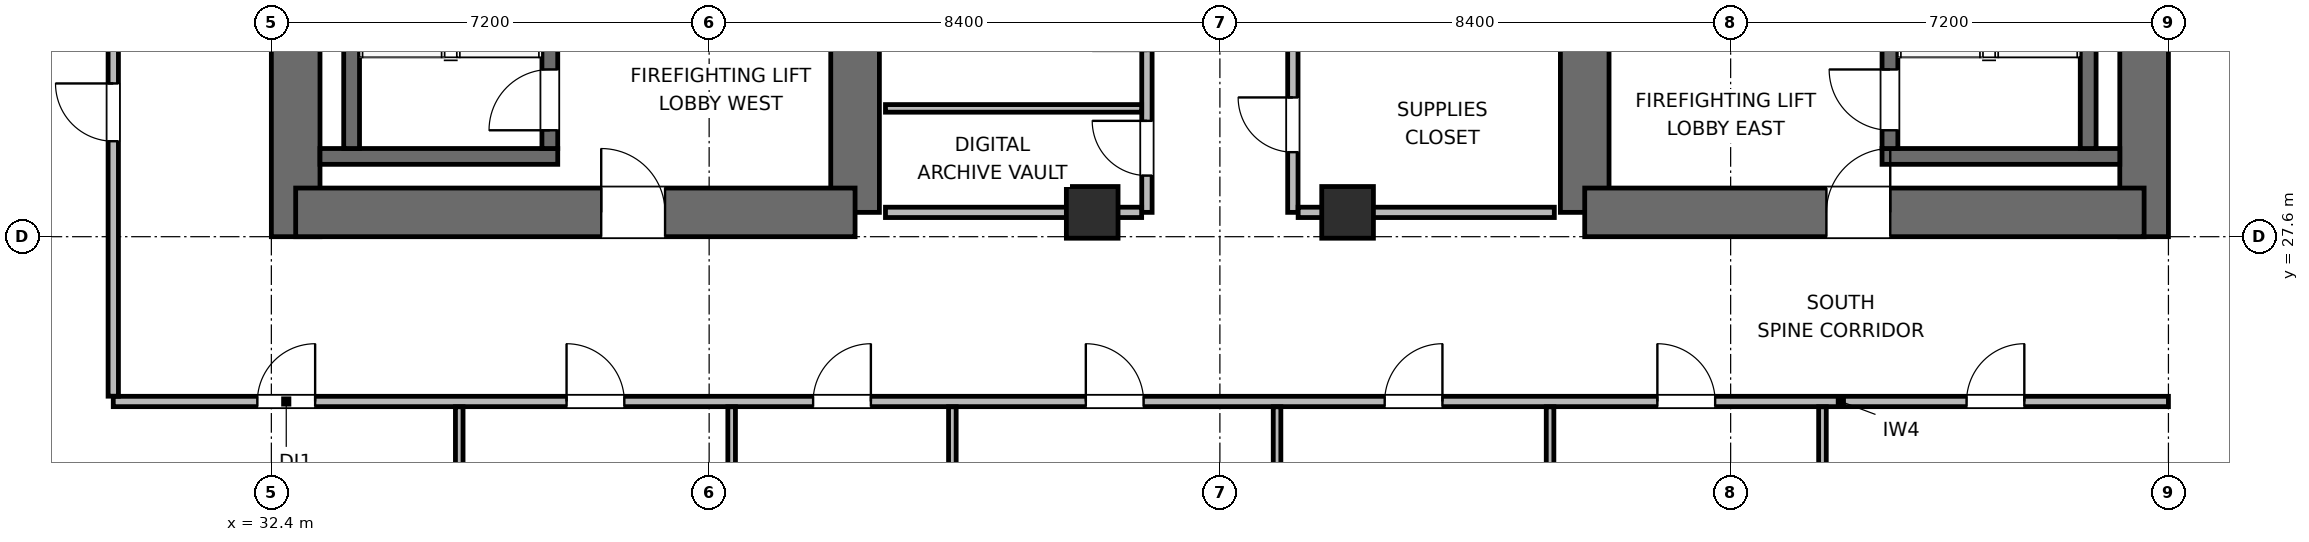
"""IFC4 building model, lengths in metres.
Left out: names, types, materials, properties, quantities, classifications, styles, units other than length and angle.
Written with IfcOpenShell. Run it as: python <this file> out.ifc"""

import sys

from ifc_helpers import new_model, si_unit, direction, frame, frame_2d, origin, origin_2d, place, context, subcontext, project, spatial, rectangle, extrude, element, fill, save


model = new_model("IFC4")
c1 = context("Model", 3, precision=1e-05, world=origin(), true_north=direction((0.0, 1.0)))
c2 = subcontext(c1, "Body", "Model", "MODEL_VIEW")
j1 = project(units=[si_unit("LENGTHUNIT", "METRE"), si_unit("PLANEANGLEUNIT", "RADIAN")], contexts=[c1])
p1 = place(None, origin())
s1 = spatial("IfcSite", under=j1, at=p1, CompositionType="ELEMENT")
p2 = place(p1, origin())
s2 = spatial("IfcBuilding", under=s1, at=p2, CompositionType="ELEMENT")
p3 = place(p2, frame((0.0, 0.0, 170.1)))
s3 = spatial("IfcBuildingStorey", under=s2, at=p3, CompositionType="ELEMENT", Elevation=170.1)
p4 = place(p3, frame((32.8, 27.6, 0.0), z_axis=(0.0, 0.0, 1.0), x_axis=(0.0, 1.0, 0.0)))
e1 = element("IfcWall", 1, at=p4, inside=s3, PredefinedType="SHEAR", context=c2, shape_type="SweptSolid", body=[
    extrude(rectangle(XDim=16.8, YDim=0.8, at=frame_2d((8.4, 0.0))), origin(), (0.0, 0.0, 1.0), 3.9),
])
p5 = place(p3, frame((42.0, 28.0, 0.0), z_axis=(0.0, 0.0, 1.0), x_axis=(0.0, 1.0, 0.0)))
e2 = element("IfcWall", 2, at=p5, inside=s3, PredefinedType="SHEAR", context=c2, shape_type="SweptSolid", body=[
    extrude(rectangle(XDim=6.4, YDim=0.8, at=frame_2d((3.2, 0.0))), origin(), (0.0, 0.0, 1.0), 3.9),
])
p6 = place(p3, frame((32.8, 28.0, 0.0), z_axis=(0.0, 0.0, 1.0), x_axis=(1.0, 0.0, 0.0)))
e3 = element("IfcWall", 3, at=p6, inside=s3, PredefinedType="SHEAR", context=c2, shape_type="SweptSolid", body=[
    extrude(rectangle(XDim=9.2, YDim=0.8, at=frame_2d((4.6, 0.0))), origin(), (0.0, 0.0, 1.0), 3.9),
])
p7 = place(p6, frame((5.025, 0.0, 0.0)))
e4 = element("IfcOpeningElement", 4, at=p7, cuts=e3, PredefinedType="OPENING", context=c2, shape_type="SweptSolid", body=[
    extrude(rectangle(XDim=1.05, YDim=2.04, at=frame_2d((0.525, 1.02))), frame((0.0, 0.41, 0.0), z_axis=(0.0, -1.0, 0.0), x_axis=(1.0, 0.0, 0.0)), (0.0, 0.0, 1.0), 0.82),
])
p8 = place(p3, frame((54.0, 28.0, 0.0), z_axis=(0.0, 0.0, 1.0), x_axis=(0.0, 1.0, 0.0)))
e5 = element("IfcWall", 5, at=p8, inside=s3, PredefinedType="SHEAR", context=c2, shape_type="SweptSolid", body=[
    extrude(rectangle(XDim=7.8, YDim=0.8, at=frame_2d((3.9, 0.0))), origin(), (0.0, 0.0, 1.0), 3.9),
])
p9 = place(p3, frame((63.2, 27.6, 0.0), z_axis=(0.0, 0.0, 1.0), x_axis=(0.0, 1.0, 0.0)))
e6 = element("IfcWall", 6, at=p9, inside=s3, PredefinedType="SHEAR", context=c2, shape_type="SweptSolid", body=[
    extrude(rectangle(XDim=16.8, YDim=0.8, at=frame_2d((8.4, 0.0))), origin(), (0.0, 0.0, 1.0), 3.9),
])
p10 = place(p3, frame((54.0, 28.0, 0.0), z_axis=(0.0, 0.0, 1.0), x_axis=(1.0, 0.0, 0.0)))
e7 = element("IfcWall", 7, at=p10, inside=s3, PredefinedType="SHEAR", context=c2, shape_type="SweptSolid", body=[
    extrude(rectangle(XDim=9.2, YDim=0.8, at=frame_2d((4.6, 0.0))), origin(), (0.0, 0.0, 1.0), 3.9),
])
p11 = place(p10, frame((3.975, 0.0, 0.0)))
e8 = element("IfcOpeningElement", 8, at=p11, cuts=e7, PredefinedType="OPENING", context=c2, shape_type="SweptSolid", body=[
    extrude(rectangle(XDim=1.05, YDim=2.04, at=frame_2d((0.525, 1.02))), frame((0.0, 0.41, 0.0), z_axis=(0.0, -1.0, 0.0), x_axis=(1.0, 0.0, 0.0)), (0.0, 0.0, 1.0), 0.82),
])
p12 = place(p3, frame((33.2, 28.92, 0.0), z_axis=(0.0, 0.0, 1.0), x_axis=(1.0, 0.0, 0.0)))
e9 = element("IfcWall", 9, at=p12, inside=s3, PredefinedType="SHEAR", context=c2, shape_type="SweptSolid", body=[
    extrude(rectangle(XDim=3.91, YDim=0.26, at=frame_2d((1.955, 0.0))), origin(), (0.0, 0.0, 1.0), 3.9),
])
p13 = place(p3, frame((33.72, 29.05, 0.0), z_axis=(0.0, 0.0, 1.0), x_axis=(0.0, 1.0, 0.0)))
e10 = element("IfcWall", 10, at=p13, inside=s3, PredefinedType="SHEAR", context=c2, shape_type="SweptSolid", body=[
    extrude(rectangle(XDim=7.6, YDim=0.26, at=frame_2d((3.8, 0.0))), origin(), (0.0, 0.0, 1.0), 3.9),
])
p14 = place(p3, frame((36.98, 29.05, 0.0), z_axis=(0.0, 0.0, 1.0), x_axis=(0.0, 1.0, 0.0)))
e11 = element("IfcWall", 11, at=p14, inside=s3, PredefinedType="SHEAR", context=c2, shape_type="SweptSolid", body=[
    extrude(rectangle(XDim=7.6, YDim=0.26, at=frame_2d((3.8, 0.0))), origin(), (0.0, 0.0, 1.0), 3.9),
])
p15 = place(p14, frame((0.3, 0.0, 0.0)))
e12 = element("IfcOpeningElement", 12, at=p15, cuts=e11, PredefinedType="OPENING", context=c2, shape_type="SweptSolid", body=[
    extrude(rectangle(XDim=1.0, YDim=2.04, at=frame_2d((0.5, 1.02))), frame((0.0, 0.14, 0.0), z_axis=(0.0, -1.0, 0.0), x_axis=(1.0, 0.0, 0.0)), (0.0, 0.0, 1.0), 0.28),
])
p16 = place(p3, frame((58.89, 28.92, 0.0), z_axis=(0.0, 0.0, 1.0), x_axis=(1.0, 0.0, 0.0)))
e13 = element("IfcWall", 13, at=p16, inside=s3, PredefinedType="SHEAR", context=c2, shape_type="SweptSolid", body=[
    extrude(rectangle(XDim=3.91, YDim=0.26, at=frame_2d((1.955, 0.0))), origin(), (0.0, 0.0, 1.0), 3.9),
])
p17 = place(p3, frame((59.02, 29.05, 0.0), z_axis=(0.0, 0.0, 1.0), x_axis=(0.0, 1.0, 0.0)))
e14 = element("IfcWall", 14, at=p17, inside=s3, PredefinedType="SHEAR", context=c2, shape_type="SweptSolid", body=[
    extrude(rectangle(XDim=7.6, YDim=0.26, at=frame_2d((3.8, 0.0))), origin(), (0.0, 0.0, 1.0), 3.9),
])
p18 = place(p17, frame((0.3, 0.0, 0.0)))
e15 = element("IfcOpeningElement", 15, at=p18, cuts=e14, PredefinedType="OPENING", context=c2, shape_type="SweptSolid", body=[
    extrude(rectangle(XDim=1.0, YDim=2.04, at=frame_2d((0.5, 1.02))), frame((0.0, 0.14, 0.0), z_axis=(0.0, -1.0, 0.0), x_axis=(1.0, 0.0, 0.0)), (0.0, 0.0, 1.0), 0.28),
])
p19 = place(p3, frame((62.28, 29.05, 0.0), z_axis=(0.0, 0.0, 1.0), x_axis=(0.0, 1.0, 0.0)))
e16 = element("IfcWall", 16, at=p19, inside=s3, PredefinedType="SHEAR", context=c2, shape_type="SweptSolid", body=[
    extrude(rectangle(XDim=7.6, YDim=0.26, at=frame_2d((3.8, 0.0))), origin(), (0.0, 0.0, 1.0), 3.9),
])
for number, where, z_axis, x_axis in (
    (17, (45.9, 28.0, 0.0), (0.0, 0.0, 1.0), (1.0, 0.0, 0.0)),
    (18, (50.1, 28.0, 0.0), (0.0, 0.0, 1.0), (1.0, 0.0, 0.0)),
):
    element("IfcColumn", number, at=place(p3, frame(where, z_axis=z_axis, x_axis=x_axis)), inside=s3, PredefinedType="COLUMN", context=c2, shape_type="SweptSolid", body=[
        extrude(rectangle(XDim=0.85, YDim=0.85, at=origin_2d()), origin(), (0.0, 0.0, 1.0), 3.9),
    ])
p20 = place(p3, frame((46.8, 28.0, 0.0), z_axis=(0.0, 0.0, 1.0), x_axis=(0.0, 1.0, 0.0)))
e19 = element("IfcWall", 19, at=p20, inside=s3, PredefinedType="PARTITIONING", context=c2, shape_type="SweptSolid", body=[
    extrude(rectangle(XDim=4.5, YDim=0.17, at=frame_2d((2.25, 0.0))), origin(), (0.0, 0.0, 1.0), 3.68),
])
p21 = place(p20, frame((0.605, 0.0, 0.0)))
e20 = element("IfcOpeningElement", 20, at=p21, cuts=e19, PredefinedType="OPENING", context=c2, shape_type="SweptSolid", body=[
    extrude(rectangle(XDim=0.9, YDim=2.02, at=frame_2d((0.45, 1.01))), frame((0.0, 0.095, 0.0), z_axis=(0.0, -1.0, 0.0), x_axis=(1.0, 0.0, 0.0)), (0.0, 0.0, 1.0), 0.19),
])
p22 = place(p20, frame((2.655, 0.0, 0.0)))
e21 = element("IfcOpeningElement", 21, at=p22, cuts=e19, PredefinedType="OPENING", context=c2, shape_type="SweptSolid", body=[
    extrude(rectangle(XDim=0.9, YDim=2.02, at=frame_2d((0.45, 1.01))), frame((0.0, 0.095, 0.0), z_axis=(0.0, -1.0, 0.0), x_axis=(1.0, 0.0, 0.0)), (0.0, 0.0, 1.0), 0.19),
])
p23 = place(p3, frame((42.5, 28.0, 0.0), z_axis=(0.0, 0.0, 1.0), x_axis=(1.0, 0.0, 0.0)))
e22 = element("IfcWall", 22, at=p23, inside=s3, PredefinedType="PARTITIONING", context=c2, shape_type="SweptSolid", body=[
    extrude(rectangle(XDim=4.213, YDim=0.17, at=frame_2d((2.106, 0.0))), origin(), (0.0, 0.0, 1.0), 2.765),
])
p24 = place(p3, frame((42.5, 29.71, 0.0), z_axis=(0.0, 0.0, 1.0), x_axis=(1.0, 0.0, 0.0)))
e23 = element("IfcWall", 23, at=p24, inside=s3, PredefinedType="PARTITIONING", context=c2, shape_type="SweptSolid", body=[
    extrude(rectangle(XDim=4.213, YDim=0.125, at=frame_2d((2.106, 0.0))), origin(), (0.0, 0.0, 1.0), 3.68),
])
p25 = place(p3, frame((49.2, 28.0, 0.0), z_axis=(0.0, 0.0, 1.0), x_axis=(0.0, 1.0, 0.0)))
e24 = element("IfcWall", 24, at=p25, inside=s3, PredefinedType="PARTITIONING", context=c2, shape_type="SweptSolid", body=[
    extrude(rectangle(XDim=4.5, YDim=0.17, at=frame_2d((2.25, 0.0))), origin(), (0.0, 0.0, 1.0), 3.68),
])
p26 = place(p25, frame((0.99, 0.0, 0.0)))
e25 = element("IfcOpeningElement", 25, at=p26, cuts=e24, PredefinedType="OPENING", context=c2, shape_type="SweptSolid", body=[
    extrude(rectangle(XDim=0.9, YDim=2.02, at=frame_2d((0.45, 1.01))), frame((0.0, 0.095, 0.0), z_axis=(0.0, -1.0, 0.0), x_axis=(1.0, 0.0, 0.0)), (0.0, 0.0, 1.0), 0.19),
])
p27 = place(p25, frame((3.24, 0.0, 0.0)))
e26 = element("IfcOpeningElement", 26, at=p27, cuts=e24, PredefinedType="OPENING", context=c2, shape_type="SweptSolid", body=[
    extrude(rectangle(XDim=0.9, YDim=2.02, at=frame_2d((0.45, 1.01))), frame((0.0, 0.095, 0.0), z_axis=(0.0, -1.0, 0.0), x_axis=(1.0, 0.0, 0.0)), (0.0, 0.0, 1.0), 0.19),
])
p28 = place(p3, frame((49.287, 28.0, 0.0), z_axis=(0.0, 0.0, 1.0), x_axis=(1.0, 0.0, 0.0)))
e27 = element("IfcWall", 27, at=p28, inside=s3, PredefinedType="PARTITIONING", context=c2, shape_type="SweptSolid", body=[
    extrude(rectangle(XDim=4.213, YDim=0.17, at=frame_2d((2.106, 0.0))), origin(), (0.0, 0.0, 1.0), 2.765),
])
p29 = place(p3, frame((29.8, 24.89, 0.0), z_axis=(0.0, 0.0, 1.0), x_axis=(1.0, 0.0, 0.0)))
e28 = element("IfcWall", 28, at=p29, inside=s3, PredefinedType="PARTITIONING", context=c2, shape_type="SweptSolid", body=[
    extrude(rectangle(XDim=33.8, YDim=0.17, at=frame_2d((16.9, 0.0))), origin(), (0.0, 0.0, 1.0), 3.68),
])
p30 = place(p29, frame((2.37, 0.0, 0.0)))
e29 = element("IfcOpeningElement", 29, at=p30, cuts=e28, PredefinedType="OPENING", context=c2, shape_type="SweptSolid", body=[
    extrude(rectangle(XDim=0.95, YDim=2.04, at=frame_2d((0.475, 1.02))), frame((0.0, 0.095, 0.0), z_axis=(0.0, -1.0, 0.0), x_axis=(1.0, 0.0, 0.0)), (0.0, 0.0, 1.0), 0.19),
])
p31 = place(p29, frame((7.455, 0.0, 0.0)))
e30 = element("IfcOpeningElement", 30, at=p31, cuts=e28, PredefinedType="OPENING", context=c2, shape_type="SweptSolid", body=[
    extrude(rectangle(XDim=0.95, YDim=2.04, at=frame_2d((0.475, 1.02))), frame((0.0, 0.095, 0.0), z_axis=(0.0, -1.0, 0.0), x_axis=(1.0, 0.0, 0.0)), (0.0, 0.0, 1.0), 0.19),
])
p32 = place(p29, frame((11.51, 0.0, 0.0)))
e31 = element("IfcOpeningElement", 31, at=p32, cuts=e28, PredefinedType="OPENING", context=c2, shape_type="SweptSolid", body=[
    extrude(rectangle(XDim=0.95, YDim=2.04, at=frame_2d((0.475, 1.02))), frame((0.0, 0.095, 0.0), z_axis=(0.0, -1.0, 0.0), x_axis=(1.0, 0.0, 0.0)), (0.0, 0.0, 1.0), 0.19),
])
p33 = place(p29, frame((15.995, 0.0, 0.0)))
e32 = element("IfcOpeningElement", 32, at=p33, cuts=e28, PredefinedType="OPENING", context=c2, shape_type="SweptSolid", body=[
    extrude(rectangle(XDim=0.95, YDim=2.04, at=frame_2d((0.475, 1.02))), frame((0.0, 0.095, 0.0), z_axis=(0.0, -1.0, 0.0), x_axis=(1.0, 0.0, 0.0)), (0.0, 0.0, 1.0), 0.19),
])
p34 = place(p29, frame((20.91, 0.0, 0.0)))
e33 = element("IfcOpeningElement", 33, at=p34, cuts=e28, PredefinedType="OPENING", context=c2, shape_type="SweptSolid", body=[
    extrude(rectangle(XDim=0.95, YDim=2.04, at=frame_2d((0.475, 1.02))), frame((0.0, 0.095, 0.0), z_axis=(0.0, -1.0, 0.0), x_axis=(1.0, 0.0, 0.0)), (0.0, 0.0, 1.0), 0.19),
])
p35 = place(p29, frame((25.395, 0.0, 0.0)))
e34 = element("IfcOpeningElement", 34, at=p35, cuts=e28, PredefinedType="OPENING", context=c2, shape_type="SweptSolid", body=[
    extrude(rectangle(XDim=0.95, YDim=2.04, at=frame_2d((0.475, 1.02))), frame((0.0, 0.095, 0.0), z_axis=(0.0, -1.0, 0.0), x_axis=(1.0, 0.0, 0.0)), (0.0, 0.0, 1.0), 0.19),
])
p36 = place(p29, frame((30.48, 0.0, 0.0)))
e35 = element("IfcOpeningElement", 35, at=p36, cuts=e28, PredefinedType="OPENING", context=c2, shape_type="SweptSolid", body=[
    extrude(rectangle(XDim=0.95, YDim=2.04, at=frame_2d((0.475, 1.02))), frame((0.0, 0.095, 0.0), z_axis=(0.0, -1.0, 0.0), x_axis=(1.0, 0.0, 0.0)), (0.0, 0.0, 1.0), 0.19),
])
p37 = place(p3, frame((29.8, 24.977, 0.0), z_axis=(0.0, 0.0, 1.0), x_axis=(0.0, 1.0, 0.0)))
e36 = element("IfcWall", 36, at=p37, inside=s3, PredefinedType="PARTITIONING", context=c2, shape_type="SweptSolid", body=[
    extrude(rectangle(XDim=9.423, YDim=0.17, at=frame_2d((4.711, 0.0))), origin(), (0.0, 0.0, 1.0), 3.68),
])
p38 = place(p37, frame((4.193, 0.0, 0.0)))
e37 = element("IfcOpeningElement", 37, at=p38, cuts=e36, PredefinedType="OPENING", context=c2, shape_type="SweptSolid", body=[
    extrude(rectangle(XDim=0.95, YDim=2.04, at=frame_2d((0.475, 1.02))), frame((0.0, 0.095, 0.0), z_axis=(0.0, -1.0, 0.0), x_axis=(1.0, 0.0, 0.0)), (0.0, 0.0, 1.0), 0.19),
])
p39 = place(p3, frame((35.49, 18.875, 0.0), z_axis=(0.0, 0.0, 1.0), x_axis=(0.0, 1.0, 0.0)))
e38 = element("IfcWall", 38, at=p39, inside=s3, PredefinedType="PARTITIONING", context=c2, shape_type="SweptSolid", body=[
    extrude(rectangle(XDim=5.928, YDim=0.125, at=frame_2d((2.964, 0.0))), origin(), (0.0, 0.0, 1.0), 3.68),
])
p40 = place(p3, frame((39.97, 18.875, 0.0), z_axis=(0.0, 0.0, 1.0), x_axis=(0.0, 1.0, 0.0)))
e39 = element("IfcWall", 39, at=p40, inside=s3, PredefinedType="PARTITIONING", context=c2, shape_type="SweptSolid", body=[
    extrude(rectangle(XDim=5.928, YDim=0.125, at=frame_2d((2.964, 0.0))), origin(), (0.0, 0.0, 1.0), 3.043),
])
p41 = place(p3, frame((43.6, 22.555, 0.0), z_axis=(0.0, 0.0, 1.0), x_axis=(0.0, 1.0, 0.0)))
e40 = element("IfcWall", 40, at=p41, inside=s3, PredefinedType="PARTITIONING", context=c2, shape_type="SweptSolid", body=[
    extrude(rectangle(XDim=2.248, YDim=0.125, at=frame_2d((1.124, 0.0))), origin(), (0.0, 0.0, 1.0), 3.043),
])
p42 = place(p3, frame((48.94, 20.475, 0.0), z_axis=(0.0, 0.0, 1.0), x_axis=(0.0, 1.0, 0.0)))
e41 = element("IfcWall", 41, at=p42, inside=s3, PredefinedType="PARTITIONING", context=c2, shape_type="SweptSolid", body=[
    extrude(rectangle(XDim=4.328, YDim=0.125, at=frame_2d((2.164, 0.0))), origin(), (0.0, 0.0, 1.0), 3.68),
])
p43 = place(p3, frame((53.43, 19.653, 0.0), z_axis=(0.0, 0.0, 1.0), x_axis=(0.0, 1.0, 0.0)))
e42 = element("IfcWall", 42, at=p43, inside=s3, PredefinedType="PARTITIONING", context=c2, shape_type="SweptSolid", body=[
    extrude(rectangle(XDim=5.15, YDim=0.125, at=frame_2d((2.575, 0.0))), origin(), (0.0, 0.0, 1.0), 3.043),
])
p44 = place(p3, frame((57.91, 18.875, 0.0), z_axis=(0.0, 0.0, 1.0), x_axis=(0.0, 1.0, 0.0)))
e43 = element("IfcWall", 43, at=p44, inside=s3, PredefinedType="PARTITIONING", context=c2, shape_type="SweptSolid", body=[
    extrude(rectangle(XDim=5.928, YDim=0.125, at=frame_2d((2.964, 0.0))), origin(), (0.0, 0.0, 1.0), 3.68),
])
p45 = place(p15, origin())
e44 = element("IfcDoor", 44, at=p45, inside=s3, OperationType="SINGLE_SWING_LEFT", PredefinedType="DOOR", context=c2, shape_type="SweptSolid", body=[
    extrude(rectangle(XDim=1.0, YDim=2.04, at=frame_2d((0.5, 1.02))), frame((0.0, 0.025, 0.0), z_axis=(0.0, -1.0, 0.0), x_axis=(1.0, 0.0, 0.0)), (0.0, 0.0, 1.0), 0.05),
])
fill(e12, e44)
p46 = place(p18, origin())
e45 = element("IfcDoor", 45, at=p46, inside=s3, OperationType="SINGLE_SWING_RIGHT", PredefinedType="DOOR", context=c2, shape_type="SweptSolid", body=[
    extrude(rectangle(XDim=1.0, YDim=2.04, at=frame_2d((0.5, 1.02))), frame((0.0, 0.025, 0.0), z_axis=(0.0, -1.0, 0.0), x_axis=(1.0, 0.0, 0.0)), (0.0, 0.0, 1.0), 0.05),
])
fill(e15, e45)
p47 = place(p7, origin())
e46 = element("IfcDoor", 46, at=p47, inside=s3, OperationType="SINGLE_SWING_LEFT", PredefinedType="DOOR", context=c2, shape_type="SweptSolid", body=[
    extrude(rectangle(XDim=1.05, YDim=2.04, at=frame_2d((0.525, 1.02))), frame((0.0, 0.025, 0.0), z_axis=(0.0, -1.0, 0.0), x_axis=(1.0, 0.0, 0.0)), (0.0, 0.0, 1.0), 0.05),
])
fill(e4, e46)
p48 = place(p11, origin())
e47 = element("IfcDoor", 47, at=p48, inside=s3, OperationType="SINGLE_SWING_RIGHT", PredefinedType="DOOR", context=c2, shape_type="SweptSolid", body=[
    extrude(rectangle(XDim=1.05, YDim=2.04, at=frame_2d((0.525, 1.02))), frame((0.0, 0.025, 0.0), z_axis=(0.0, -1.0, 0.0), x_axis=(1.0, 0.0, 0.0)), (0.0, 0.0, 1.0), 0.05),
])
fill(e8, e47)
p49 = place(p21, origin())
e48 = element("IfcDoor", 48, at=p49, inside=s3, OperationType="SINGLE_SWING_RIGHT", PredefinedType="DOOR", context=c2, shape_type="SweptSolid", body=[
    extrude(rectangle(XDim=0.9, YDim=2.02, at=frame_2d((0.45, 1.01))), frame((0.0, 0.025, 0.0), z_axis=(0.0, -1.0, 0.0), x_axis=(1.0, 0.0, 0.0)), (0.0, 0.0, 1.0), 0.05),
])
fill(e20, e48)
p50 = place(p26, origin())
e49 = element("IfcDoor", 49, at=p50, inside=s3, OperationType="SINGLE_SWING_RIGHT", PredefinedType="DOOR", context=c2, shape_type="SweptSolid", body=[
    extrude(rectangle(XDim=0.9, YDim=2.02, at=frame_2d((0.45, 1.01))), frame((0.0, 0.025, 0.0), z_axis=(0.0, -1.0, 0.0), x_axis=(1.0, 0.0, 0.0)), (0.0, 0.0, 1.0), 0.05),
])
fill(e25, e49)
p51 = place(p30, origin())
e50 = element("IfcDoor", 50, at=p51, inside=s3, OperationType="SINGLE_SWING_RIGHT", PredefinedType="DOOR", context=c2, shape_type="SweptSolid", body=[
    extrude(rectangle(XDim=0.95, YDim=2.04, at=frame_2d((0.475, 1.02))), frame((0.0, 0.025, 0.0), z_axis=(0.0, -1.0, 0.0), x_axis=(1.0, 0.0, 0.0)), (0.0, 0.0, 1.0), 0.05),
])
fill(e29, e50)
p52 = place(p31, origin())
e51 = element("IfcDoor", 51, at=p52, inside=s3, OperationType="SINGLE_SWING_LEFT", PredefinedType="DOOR", context=c2, shape_type="SweptSolid", body=[
    extrude(rectangle(XDim=0.95, YDim=2.04, at=frame_2d((0.475, 1.02))), frame((0.0, 0.025, 0.0), z_axis=(0.0, -1.0, 0.0), x_axis=(1.0, 0.0, 0.0)), (0.0, 0.0, 1.0), 0.05),
])
fill(e30, e51)
p53 = place(p32, origin())
e52 = element("IfcDoor", 52, at=p53, inside=s3, OperationType="SINGLE_SWING_RIGHT", PredefinedType="DOOR", context=c2, shape_type="SweptSolid", body=[
    extrude(rectangle(XDim=0.95, YDim=2.04, at=frame_2d((0.475, 1.02))), frame((0.0, 0.025, 0.0), z_axis=(0.0, -1.0, 0.0), x_axis=(1.0, 0.0, 0.0)), (0.0, 0.0, 1.0), 0.05),
])
fill(e31, e52)
p54 = place(p33, origin())
e53 = element("IfcDoor", 53, at=p54, inside=s3, OperationType="SINGLE_SWING_LEFT", PredefinedType="DOOR", context=c2, shape_type="SweptSolid", body=[
    extrude(rectangle(XDim=0.95, YDim=2.04, at=frame_2d((0.475, 1.02))), frame((0.0, 0.025, 0.0), z_axis=(0.0, -1.0, 0.0), x_axis=(1.0, 0.0, 0.0)), (0.0, 0.0, 1.0), 0.05),
])
fill(e32, e53)
p55 = place(p34, origin())
e54 = element("IfcDoor", 54, at=p55, inside=s3, OperationType="SINGLE_SWING_RIGHT", PredefinedType="DOOR", context=c2, shape_type="SweptSolid", body=[
    extrude(rectangle(XDim=0.95, YDim=2.04, at=frame_2d((0.475, 1.02))), frame((0.0, 0.025, 0.0), z_axis=(0.0, -1.0, 0.0), x_axis=(1.0, 0.0, 0.0)), (0.0, 0.0, 1.0), 0.05),
])
fill(e33, e54)
p56 = place(p35, origin())
e55 = element("IfcDoor", 55, at=p56, inside=s3, OperationType="SINGLE_SWING_LEFT", PredefinedType="DOOR", context=c2, shape_type="SweptSolid", body=[
    extrude(rectangle(XDim=0.95, YDim=2.04, at=frame_2d((0.475, 1.02))), frame((0.0, 0.025, 0.0), z_axis=(0.0, -1.0, 0.0), x_axis=(1.0, 0.0, 0.0)), (0.0, 0.0, 1.0), 0.05),
])
fill(e34, e55)
p57 = place(p36, origin())
e56 = element("IfcDoor", 56, at=p57, inside=s3, OperationType="SINGLE_SWING_RIGHT", PredefinedType="DOOR", context=c2, shape_type="SweptSolid", body=[
    extrude(rectangle(XDim=0.95, YDim=2.04, at=frame_2d((0.475, 1.02))), frame((0.0, 0.025, 0.0), z_axis=(0.0, -1.0, 0.0), x_axis=(1.0, 0.0, 0.0)), (0.0, 0.0, 1.0), 0.05),
])
fill(e35, e56)
p58 = place(p38, origin())
e57 = element("IfcDoor", 57, at=p58, inside=s3, OperationType="SINGLE_SWING_RIGHT", PredefinedType="DOOR", context=c2, shape_type="SweptSolid", body=[
    extrude(rectangle(XDim=0.95, YDim=2.04, at=frame_2d((0.475, 1.02))), frame((0.0, 0.025, 0.0), z_axis=(0.0, -1.0, 0.0), x_axis=(1.0, 0.0, 0.0)), (0.0, 0.0, 1.0), 0.05),
])
fill(e37, e57)
save(model, sys.argv[1])
